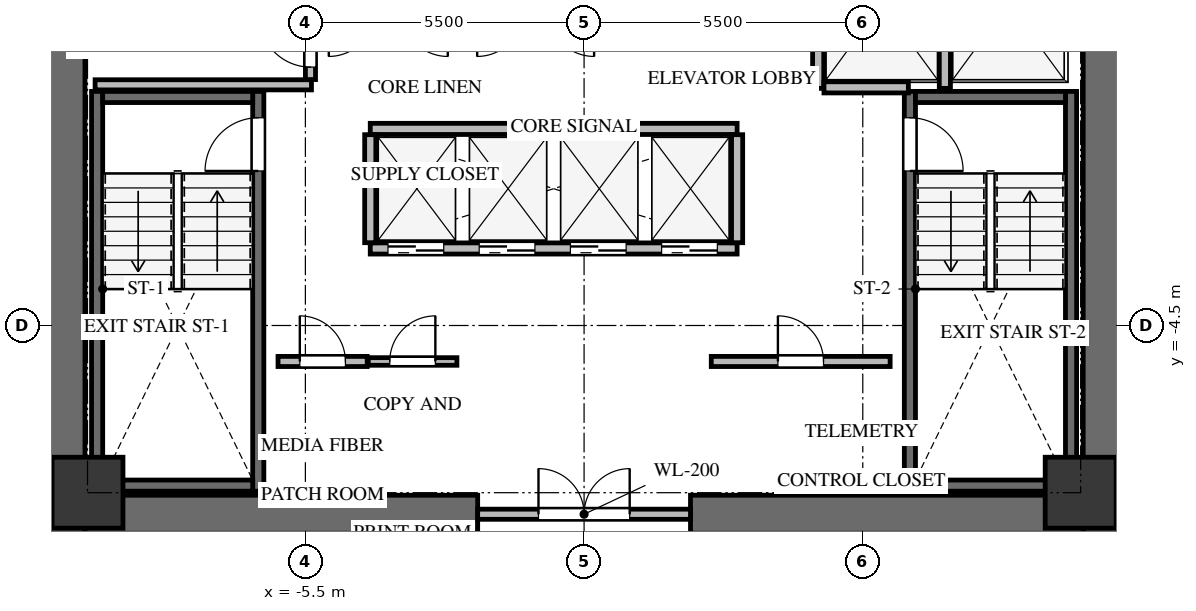
"""IFC4 building model, lengths in metres.
Left out: names, types, materials, properties, quantities, classifications, styles, units other than length and angle.
Written with IfcOpenShell. Run it as: python <this file> out.ifc"""

import sys

from ifc_helpers import new_model, si_unit, direction, frame, frame_2d, origin, origin_2d, place, context, subcontext, project, spatial, rectangle, extrude, source, transform, mapped, element, fill, save


model = new_model("IFC4")
c1 = context("Model", 3, precision=1e-05, world=origin(), true_north=direction((0.0, 1.0)))
c2 = subcontext(c1, "Body", "Model", "MODEL_VIEW")
j1 = project(units=[si_unit("LENGTHUNIT", "METRE"), si_unit("PLANEANGLEUNIT", "RADIAN")], contexts=[c1])
p1 = place(None, origin())
s1 = spatial("IfcSite", under=j1, at=p1, CompositionType="ELEMENT")
p2 = place(p1, origin())
s2 = spatial("IfcBuilding", under=s1, at=p2, CompositionType="ELEMENT")
p3 = place(p2, frame((0.0, 0.0, 137.1)))
s3 = spatial("IfcBuildingStorey", under=s2, at=p3, CompositionType="ELEMENT", Elevation=137.1)
for number, where, z_axis, x_axis in (
    (1, (-10.225, -8.6, 0.0), (0.0, 0.0, 1.0), (0.0, 1.0, 0.0)),
    (2, (10.225, -8.6, 0.0), (0.0, 0.0, 1.0), (0.0, 1.0, 0.0)),
):
    element("IfcWall", number, at=place(p3, frame(where, z_axis=z_axis, x_axis=x_axis)), inside=s3, PredefinedType="SHEAR", context=c2, shape_type="SweptSolid", body=[
        extrude(rectangle(XDim=17.2, YDim=0.75, at=frame_2d((8.6, 0.0))), origin(), (0.0, 0.0, 1.0), 3.0),
    ])
for number, where, z_axis, x_axis in (
    (3, (-9.85, -8.225, 0.0), (0.0, 0.0, 1.0), (1.0, 0.0, 0.0)),
    (4, (2.1, -8.225, 0.0), (0.0, 0.0, 1.0), (1.0, 0.0, 0.0)),
):
    element("IfcWall", number, at=place(p3, frame(where, z_axis=z_axis, x_axis=x_axis)), inside=s3, PredefinedType="SHEAR", context=c2, shape_type="SweptSolid", body=[
        extrude(rectangle(XDim=7.75, YDim=0.75, at=frame_2d((3.875, 0.0))), origin(), (0.0, 0.0, 1.0), 3.0),
    ])
p4 = place(p3, frame((-6.43, -7.77, -0.24), z_axis=(0.0, 0.0, 1.0), x_axis=(0.0, 1.0, 0.0)))
e5 = element("IfcWall", 5, at=p4, inside=s3, PredefinedType="SHEAR", context=c2, shape_type="SweptSolid", body=[
    extrude(rectangle(XDim=7.89, YDim=0.22, at=frame_2d((3.945, 0.0))), origin(), (0.0, 0.0, 1.0), 3.0),
])
p5 = place(p4, frame((6.32, 0.0, 0.0)))
e6 = element("IfcOpeningElement", 6, at=p5, cuts=e5, PredefinedType="OPENING", context=c2, shape_type="SweptSolid", body=[
    extrude(rectangle(XDim=1.05, YDim=2.15, at=frame_2d((0.525, 1.075))), frame((0.0, 0.12, 0.0), z_axis=(0.0, -1.0, 0.0), x_axis=(1.0, 0.0, 0.0)), (0.0, 0.0, 1.0), 0.24),
])
p6 = place(p3, frame((-9.61, 0.12, -0.24), z_axis=(0.0, 0.0, 1.0), x_axis=(0.0, -1.0, 0.0)))
e7 = element("IfcWall", 7, at=p6, inside=s3, PredefinedType="SHEAR", context=c2, shape_type="SweptSolid", body=[
    extrude(rectangle(XDim=7.89, YDim=0.22, at=frame_2d((3.945, 0.0))), origin(), (0.0, 0.0, 1.0), 3.0),
])
for number, where, z_axis, x_axis in (
    (8, (-9.5, -7.66, -0.24), (0.0, 0.0, 1.0), (1.0, 0.0, 0.0)),
    (9, (-6.54, 0.01, -0.24), (0.0, 0.0, 1.0), (-1.0, 0.0, 0.0)),
):
    element("IfcWall", number, at=place(p3, frame(where, z_axis=z_axis, x_axis=x_axis)), inside=s3, PredefinedType="SHEAR", context=c2, shape_type="SweptSolid", body=[
        extrude(rectangle(XDim=2.96, YDim=0.22, at=frame_2d((1.48, 0.0))), origin(), (0.0, 0.0, 1.0), 3.0),
    ])
p7 = place(p3, frame((9.61, -7.77, -0.24), z_axis=(0.0, 0.0, 1.0), x_axis=(0.0, 1.0, 0.0)))
e10 = element("IfcWall", 10, at=p7, inside=s3, PredefinedType="SHEAR", context=c2, shape_type="SweptSolid", body=[
    extrude(rectangle(XDim=7.89, YDim=0.22, at=frame_2d((3.945, 0.0))), origin(), (0.0, 0.0, 1.0), 3.0),
])
p8 = place(p3, frame((6.43, 0.12, -0.24), z_axis=(0.0, 0.0, 1.0), x_axis=(0.0, -1.0, 0.0)))
e11 = element("IfcWall", 11, at=p8, inside=s3, PredefinedType="SHEAR", context=c2, shape_type="SweptSolid", body=[
    extrude(rectangle(XDim=7.89, YDim=0.22, at=frame_2d((3.945, 0.0))), origin(), (0.0, 0.0, 1.0), 3.0),
])
p9 = place(p8, frame((0.52, 0.0, 0.0)))
e12 = element("IfcOpeningElement", 12, at=p9, cuts=e11, PredefinedType="OPENING", context=c2, shape_type="SweptSolid", body=[
    extrude(rectangle(XDim=1.05, YDim=2.15, at=frame_2d((0.525, 1.075))), frame((0.0, 0.12, 0.0), z_axis=(0.0, -1.0, 0.0), x_axis=(1.0, 0.0, 0.0)), (0.0, 0.0, 1.0), 0.24),
])
for number, where, z_axis, x_axis in (
    (13, (6.54, -7.66, -0.24), (0.0, 0.0, 1.0), (1.0, 0.0, 0.0)),
    (14, (9.5, 0.01, -0.24), (0.0, 0.0, 1.0), (-1.0, 0.0, 0.0)),
):
    element("IfcWall", number, at=place(p3, frame(where, z_axis=z_axis, x_axis=x_axis)), inside=s3, PredefinedType="SHEAR", context=c2, shape_type="SweptSolid", body=[
        extrude(rectangle(XDim=2.96, YDim=0.22, at=frame_2d((1.48, 0.0))), origin(), (0.0, 0.0, 1.0), 3.0),
    ])
m1 = source(origin(), c2, "Body", "SweptSolid", [
    extrude(rectangle(XDim=1.4, YDim=1.4, at=origin_2d()), origin(), (0.0, 0.0, 1.0), 3.0),
])
for number, where, z_axis, x_axis in (
    (15, (-9.8, -7.8, -0.24), (0.0, 0.0, 1.0), (1.0, 0.0, 0.0)),
    (16, (9.8, -7.8, -0.24), (0.0, 0.0, 1.0), (1.0, 0.0, 0.0)),
):
    element("IfcColumn", number, at=place(p3, frame(where, z_axis=z_axis, x_axis=x_axis)), inside=s3, PredefinedType="COLUMN", context=c2, shape_type="MappedRepresentation", body=[
        mapped(m1, transform((0.0, 0.0, 0.0), x_axis=(1.0, 0.0, 0.0), y_axis=(0.0, 1.0, 0.0), z_axis=(0.0, 0.0, 1.0), scale=1.0)),
    ])
p10 = place(p3, frame((-2.1, -8.225, 0.0), z_axis=(0.0, 0.0, 1.0), x_axis=(1.0, 0.0, 0.0)))
e17 = element("IfcWall", 17, at=p10, inside=s3, PredefinedType="SOLIDWALL", context=c2, shape_type="SweptSolid", body=[
    extrude(rectangle(XDim=4.2, YDim=0.2, at=frame_2d((2.1, 0.0))), origin(), (0.0, 0.0, 1.0), 2.745),
])
p11 = place(p10, frame((1.2, 0.0, 0.0)))
e18 = element("IfcOpeningElement", 18, at=p11, cuts=e17, PredefinedType="OPENING", context=c2, shape_type="SweptSolid", body=[
    extrude(rectangle(XDim=1.8, YDim=2.15, at=frame_2d((0.9, 1.075))), frame((0.0, 0.11, 0.0), z_axis=(0.0, -1.0, 0.0), x_axis=(1.0, 0.0, 0.0)), (0.0, 0.0, 1.0), 0.22),
])
p12 = place(p3, frame((-9.65, 0.25, 0.0), z_axis=(0.0, 0.0, 1.0), x_axis=(1.0, 0.0, 0.0)))
e19 = element("IfcWall", 19, at=p12, inside=s3, PredefinedType="SOLIDWALL", context=c2, shape_type="SweptSolid", body=[
    extrude(rectangle(XDim=4.27, YDim=0.2, at=frame_2d((2.135, 0.0))), origin(), (0.0, 0.0, 1.0), 2.745),
])
p13 = place(p3, frame((-5.4, 0.354, 0.0), z_axis=(0.0, 0.0, 1.0), x_axis=(0.0, 1.0, 0.0)))
e20 = element("IfcWall", 20, at=p13, inside=s3, PredefinedType="SOLIDWALL", context=c2, shape_type="SweptSolid", body=[
    extrude(rectangle(XDim=4.026, YDim=0.2, at=frame_2d((2.013, 0.0))), origin(), (0.0, 0.0, 1.0), 2.745),
])
p14 = place(p13, frame((0.246, 0.0, 0.0)))
e21 = element("IfcOpeningElement", 21, at=p14, cuts=e20, PredefinedType="OPENING", context=c2, shape_type="SweptSolid", body=[
    extrude(rectangle(XDim=1.0, YDim=2.15, at=frame_2d((0.5, 1.075))), frame((0.0, 0.11, 0.0), z_axis=(0.0, -1.0, 0.0), x_axis=(1.0, 0.0, 0.0)), (0.0, 0.0, 1.0), 0.22),
])
for number, where, z_axis, x_axis in (
    (22, (4.62, 0.18, 0.0), (0.0, 0.0, 1.0), (0.0, 1.0, 0.0)),
    (23, (7.12, 0.18, 0.0), (0.0, 0.0, 1.0), (0.0, 1.0, 0.0)),
):
    element("IfcWall", number, at=place(p3, frame(where, z_axis=z_axis, x_axis=x_axis)), inside=s3, PredefinedType="SOLIDWALL", context=c2, shape_type="SweptSolid", body=[
        extrude(rectangle(XDim=3.186, YDim=0.22, at=frame_2d((1.593, 0.0))), origin(), (0.0, 0.0, 1.0), 2.745),
    ])
p15 = place(p3, frame((4.734, 0.2, 0.0), z_axis=(0.0, 0.0, 1.0), x_axis=(1.0, 0.0, 0.0)))
e24 = element("IfcWall", 24, at=p15, inside=s3, PredefinedType="SOLIDWALL", context=c2, shape_type="SweptSolid", body=[
    extrude(rectangle(XDim=1.666, YDim=0.22, at=frame_2d((0.833, 0.0))), origin(), (0.0, 0.0, 1.0), 2.745),
])
p16 = place(p3, frame((-4.22, -2.98, 0.0), z_axis=(0.0, 0.0, 1.0), x_axis=(1.0, 0.0, 0.0)))
e25 = element("IfcWall", 25, at=p16, inside=s3, PredefinedType="SOLIDWALL", context=c2, shape_type="SweptSolid", body=[
    extrude(rectangle(XDim=7.24, YDim=0.22, at=frame_2d((3.62, 0.0))), origin(), (0.0, 0.0, 1.0), 2.745),
])
p17 = place(p16, frame((0.35, 0.0, 0.0)))
e26 = element("IfcOpeningElement", 26, at=p17, cuts=e25, PredefinedType="OPENING", context=c2, shape_type="SweptSolid", body=[
    extrude(rectangle(XDim=1.1, YDim=2.15, at=frame_2d((0.55, 1.075))), frame((0.0, 0.12, 0.0), z_axis=(0.0, -1.0, 0.0), x_axis=(1.0, 0.0, 0.0)), (0.0, 0.0, 1.0), 0.24),
])
p18 = place(p16, frame((2.15, 0.0, 0.0)))
e27 = element("IfcOpeningElement", 27, at=p18, cuts=e25, PredefinedType="OPENING", context=c2, shape_type="SweptSolid", body=[
    extrude(rectangle(XDim=1.1, YDim=2.15, at=frame_2d((0.55, 1.075))), frame((0.0, 0.12, 0.0), z_axis=(0.0, -1.0, 0.0), x_axis=(1.0, 0.0, 0.0)), (0.0, 0.0, 1.0), 0.24),
])
p19 = place(p16, frame((3.95, 0.0, 0.0)))
e28 = element("IfcOpeningElement", 28, at=p19, cuts=e25, PredefinedType="OPENING", context=c2, shape_type="SweptSolid", body=[
    extrude(rectangle(XDim=1.1, YDim=2.15, at=frame_2d((0.55, 1.075))), frame((0.0, 0.12, 0.0), z_axis=(0.0, -1.0, 0.0), x_axis=(1.0, 0.0, 0.0)), (0.0, 0.0, 1.0), 0.24),
])
p20 = place(p16, frame((5.75, 0.0, 0.0)))
e29 = element("IfcOpeningElement", 29, at=p20, cuts=e25, PredefinedType="OPENING", context=c2, shape_type="SweptSolid", body=[
    extrude(rectangle(XDim=1.1, YDim=2.15, at=frame_2d((0.55, 1.075))), frame((0.0, 0.12, 0.0), z_axis=(0.0, -1.0, 0.0), x_axis=(1.0, 0.0, 0.0)), (0.0, 0.0, 1.0), 0.24),
])
p21 = place(p3, frame((-4.22, -0.62, 0.0), z_axis=(0.0, 0.0, 1.0), x_axis=(1.0, 0.0, 0.0)))
e30 = element("IfcWall", 30, at=p21, inside=s3, PredefinedType="SOLIDWALL", context=c2, shape_type="SweptSolid", body=[
    extrude(rectangle(XDim=7.24, YDim=0.22, at=frame_2d((3.62, 0.0))), origin(), (0.0, 0.0, 1.0), 2.745),
])
for number, where, z_axis, x_axis in (
    (31, (-4.22, -2.866, 0.0), (0.0, 0.0, 1.0), (0.0, 1.0, 0.0)),
    (32, (3.02, -2.866, 0.0), (0.0, 0.0, 1.0), (0.0, 1.0, 0.0)),
):
    element("IfcWall", number, at=place(p3, frame(where, z_axis=z_axis, x_axis=x_axis)), inside=s3, PredefinedType="SOLIDWALL", context=c2, shape_type="SweptSolid", body=[
        extrude(rectangle(XDim=2.132, YDim=0.22, at=frame_2d((1.066, 0.0))), origin(), (0.0, 0.0, 1.0), 2.745),
    ])
p22 = place(p3, frame((-6.04, -5.21, 0.0), z_axis=(0.0, 0.0, 1.0), x_axis=(1.0, 0.0, 0.0)))
e33 = element("IfcWall", 33, at=p22, inside=s3, PredefinedType="SOLIDWALL", context=c2, shape_type="SweptSolid", body=[
    extrude(rectangle(XDim=1.76, YDim=0.2, at=frame_2d((0.88, 0.0))), origin(), (0.0, 0.0, 1.0), 2.745),
])
p23 = place(p22, frame((0.43, 0.0, 0.0)))
e34 = element("IfcOpeningElement", 34, at=p23, cuts=e33, PredefinedType="OPENING", context=c2, shape_type="SweptSolid", body=[
    extrude(rectangle(XDim=0.9, YDim=2.05, at=frame_2d((0.45, 1.025))), frame((0.0, 0.11, 0.0), z_axis=(0.0, -1.0, 0.0), x_axis=(1.0, 0.0, 0.0)), (0.0, 0.0, 1.0), 0.22),
])
p24 = place(p3, frame((-4.26, -5.21, 0.0), z_axis=(0.0, 0.0, 1.0), x_axis=(1.0, 0.0, 0.0)))
e35 = element("IfcWall", 35, at=p24, inside=s3, PredefinedType="PARTITIONING", context=c2, shape_type="SweptSolid", body=[
    extrude(rectangle(XDim=1.75, YDim=0.15, at=frame_2d((0.875, 0.0))), origin(), (0.0, 0.0, 1.0), 2.745),
])
p25 = place(p24, frame((0.425, 0.0, 0.0)))
e36 = element("IfcOpeningElement", 36, at=p25, cuts=e35, PredefinedType="OPENING", context=c2, shape_type="SweptSolid", body=[
    extrude(rectangle(XDim=0.9, YDim=2.05, at=frame_2d((0.45, 1.025))), frame((0.0, 0.085, 0.0), z_axis=(0.0, -1.0, 0.0), x_axis=(1.0, 0.0, 0.0)), (0.0, 0.0, 1.0), 0.17),
])
p26 = place(p3, frame((2.51, -5.21, 0.0), z_axis=(0.0, 0.0, 1.0), x_axis=(1.0, 0.0, 0.0)))
e37 = element("IfcWall", 37, at=p26, inside=s3, PredefinedType="SOLIDWALL", context=c2, shape_type="SweptSolid", body=[
    extrude(rectangle(XDim=3.53, YDim=0.2, at=frame_2d((1.765, 0.0))), origin(), (0.0, 0.0, 1.0), 2.745),
])
p27 = place(p26, frame((1.315, 0.0, 0.0)))
e38 = element("IfcOpeningElement", 38, at=p27, cuts=e37, PredefinedType="OPENING", context=c2, shape_type="SweptSolid", body=[
    extrude(rectangle(XDim=0.9, YDim=2.05, at=frame_2d((0.45, 1.025))), frame((0.0, 0.11, 0.0), z_axis=(0.0, -1.0, 0.0), x_axis=(1.0, 0.0, 0.0)), (0.0, 0.0, 1.0), 0.22),
])
m2 = source(origin(), c2, "Body", "SweptSolid", [
    extrude(rectangle(XDim=1.05, YDim=2.15, at=frame_2d((0.525, 1.075))), frame((0.0, 0.025, 0.0), z_axis=(0.0, -1.0, 0.0), x_axis=(1.0, 0.0, 0.0)), (0.0, 0.0, 1.0), 0.05),
])
p28 = place(p5, origin())
e39 = element("IfcDoor", 39, at=p28, inside=s3, OperationType="SINGLE_SWING_LEFT", PredefinedType="DOOR", context=c2, shape_type="MappedRepresentation", body=[
    mapped(m2, transform((0.0, 0.0, 0.0), x_axis=(1.0, 0.0, 0.0), y_axis=(0.0, 1.0, 0.0), z_axis=(0.0, 0.0, 1.0), scale=1.0)),
])
fill(e6, e39)
m3 = source(origin(), c2, "Body", "SweptSolid", [
    extrude(rectangle(XDim=1.05, YDim=2.15, at=frame_2d((0.525, 1.075))), frame((0.0, 0.025, 0.0), z_axis=(0.0, -1.0, 0.0), x_axis=(1.0, 0.0, 0.0)), (0.0, 0.0, 1.0), 0.05),
])
p29 = place(p9, origin())
e40 = element("IfcDoor", 40, at=p29, inside=s3, OperationType="SINGLE_SWING_RIGHT", PredefinedType="DOOR", context=c2, shape_type="MappedRepresentation", body=[
    mapped(m3, transform((0.0, 0.0, 0.0), x_axis=(1.0, 0.0, 0.0), y_axis=(0.0, 1.0, 0.0), z_axis=(0.0, 0.0, 1.0), scale=1.0)),
])
fill(e12, e40)
m4 = source(origin(), c2, "Body", "SweptSolid", [
    extrude(rectangle(XDim=1.8, YDim=2.15, at=frame_2d((0.9, 1.075))), frame((0.0, 0.025, 0.0), z_axis=(0.0, -1.0, 0.0), x_axis=(1.0, 0.0, 0.0)), (0.0, 0.0, 1.0), 0.05),
])
p30 = place(p11, origin())
e41 = element("IfcDoor", 41, at=p30, inside=s3, OperationType="DOUBLE_DOOR_SINGLE_SWING", PredefinedType="DOOR", context=c2, shape_type="MappedRepresentation", body=[
    mapped(m4, transform((0.0, 0.0, 0.0), x_axis=(1.0, 0.0, 0.0), y_axis=(0.0, 1.0, 0.0), z_axis=(0.0, 0.0, 1.0), scale=1.0)),
])
fill(e18, e41)
m5 = source(origin(), c2, "Body", "SweptSolid", [
    extrude(rectangle(XDim=1.0, YDim=2.15, at=frame_2d((0.5, 1.075))), frame((0.0, 0.025, 0.0), z_axis=(0.0, -1.0, 0.0), x_axis=(1.0, 0.0, 0.0)), (0.0, 0.0, 1.0), 0.05),
])
p31 = place(p14, origin())
e42 = element("IfcDoor", 42, at=p31, inside=s3, OperationType="SINGLE_SWING_RIGHT", PredefinedType="DOOR", context=c2, shape_type="MappedRepresentation", body=[
    mapped(m5, transform((0.0, 0.0, 0.0), x_axis=(1.0, 0.0, 0.0), y_axis=(0.0, 1.0, 0.0), z_axis=(0.0, 0.0, 1.0), scale=1.0)),
])
fill(e21, e42)
m6 = source(origin(), c2, "Body", "SweptSolid", [
    extrude(rectangle(XDim=1.1, YDim=2.15, at=frame_2d((0.55, 1.075))), frame((0.0, 0.025, 0.0), z_axis=(0.0, -1.0, 0.0), x_axis=(1.0, 0.0, 0.0)), (0.0, 0.0, 1.0), 0.05),
])
p32 = place(p17, origin())
e43 = element("IfcDoor", 43, at=p32, inside=s3, OperationType="DOUBLE_DOOR_SLIDING", PredefinedType="DOOR", context=c2, shape_type="MappedRepresentation", body=[
    mapped(m6, transform((0.0, 0.0, 0.0), x_axis=(1.0, 0.0, 0.0), y_axis=(0.0, 1.0, 0.0), z_axis=(0.0, 0.0, 1.0), scale=1.0)),
])
fill(e26, e43)
p33 = place(p18, origin())
e44 = element("IfcDoor", 44, at=p33, inside=s3, OperationType="DOUBLE_DOOR_SLIDING", PredefinedType="DOOR", context=c2, shape_type="MappedRepresentation", body=[
    mapped(m6, transform((0.0, 0.0, 0.0), x_axis=(1.0, 0.0, 0.0), y_axis=(0.0, 1.0, 0.0), z_axis=(0.0, 0.0, 1.0), scale=1.0)),
])
fill(e27, e44)
p34 = place(p19, origin())
e45 = element("IfcDoor", 45, at=p34, inside=s3, OperationType="DOUBLE_DOOR_SLIDING", PredefinedType="DOOR", context=c2, shape_type="MappedRepresentation", body=[
    mapped(m6, transform((0.0, 0.0, 0.0), x_axis=(1.0, 0.0, 0.0), y_axis=(0.0, 1.0, 0.0), z_axis=(0.0, 0.0, 1.0), scale=1.0)),
])
fill(e28, e45)
p35 = place(p20, origin())
e46 = element("IfcDoor", 46, at=p35, inside=s3, OperationType="DOUBLE_DOOR_SLIDING", PredefinedType="DOOR", context=c2, shape_type="MappedRepresentation", body=[
    mapped(m6, transform((0.0, 0.0, 0.0), x_axis=(1.0, 0.0, 0.0), y_axis=(0.0, 1.0, 0.0), z_axis=(0.0, 0.0, 1.0), scale=1.0)),
])
fill(e29, e46)
m7 = source(origin(), c2, "Body", "SweptSolid", [
    extrude(rectangle(XDim=0.9, YDim=2.05, at=frame_2d((0.45, 1.025))), frame((0.0, 0.025, 0.0), z_axis=(0.0, -1.0, 0.0), x_axis=(1.0, 0.0, 0.0)), (0.0, 0.0, 1.0), 0.05),
])
p36 = place(p23, origin())
e47 = element("IfcDoor", 47, at=p36, inside=s3, OperationType="SINGLE_SWING_LEFT", PredefinedType="DOOR", context=c2, shape_type="MappedRepresentation", body=[
    mapped(m7, transform((0.0, 0.0, 0.0), x_axis=(1.0, 0.0, 0.0), y_axis=(0.0, 1.0, 0.0), z_axis=(0.0, 0.0, 1.0), scale=1.0)),
])
fill(e34, e47)
m8 = source(origin(), c2, "Body", "SweptSolid", [
    extrude(rectangle(XDim=0.9, YDim=2.05, at=frame_2d((0.45, 1.025))), frame((0.0, 0.025, 0.0), z_axis=(0.0, -1.0, 0.0), x_axis=(1.0, 0.0, 0.0)), (0.0, 0.0, 1.0), 0.05),
])
p37 = place(p25, origin())
e48 = element("IfcDoor", 48, at=p37, inside=s3, OperationType="SINGLE_SWING_RIGHT", PredefinedType="DOOR", context=c2, shape_type="MappedRepresentation", body=[
    mapped(m8, transform((0.0, 0.0, 0.0), x_axis=(1.0, 0.0, 0.0), y_axis=(0.0, 1.0, 0.0), z_axis=(0.0, 0.0, 1.0), scale=1.0)),
])
fill(e36, e48)
p38 = place(p27, origin())
e49 = element("IfcDoor", 49, at=p38, inside=s3, OperationType="SINGLE_SWING_LEFT", PredefinedType="DOOR", context=c2, shape_type="MappedRepresentation", body=[
    mapped(m7, transform((0.0, 0.0, 0.0), x_axis=(1.0, 0.0, 0.0), y_axis=(0.0, 1.0, 0.0), z_axis=(0.0, 0.0, 1.0), scale=1.0)),
])
fill(e38, e49)
save(model, sys.argv[1])
